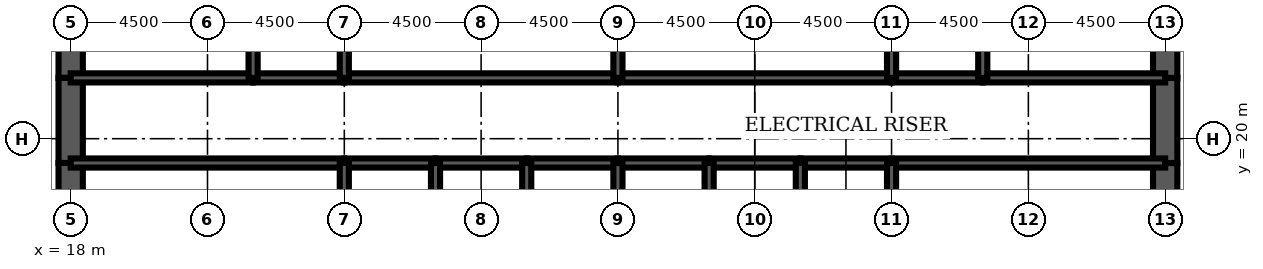
"""IFC4 building model, lengths in metres.
Left out: names, types, materials, properties, quantities, classifications, styles, units other than length and angle.
Written with IfcOpenShell. Run it as: python <this file> out.ifc"""

import sys

from ifc_helpers import new_model, si_unit, direction, frame, frame_2d, origin, place, context, subcontext, project, spatial, rectangle, extrude, element, fill, save


model = new_model("IFC4")
c1 = context("Model", 3, precision=1e-05, world=origin(), true_north=direction((0.0, 1.0)))
c2 = subcontext(c1, "Body", "Model", "MODEL_VIEW")
j1 = project(units=[si_unit("LENGTHUNIT", "METRE"), si_unit("PLANEANGLEUNIT", "RADIAN")], contexts=[c1])
p1 = place(None, origin())
s1 = spatial("IfcSite", under=j1, at=p1, CompositionType="ELEMENT")
p2 = place(p1, origin())
s2 = spatial("IfcBuilding", under=s1, at=p2, CompositionType="ELEMENT")
p3 = place(p2, frame((0.0, 0.0, 194.2)))
s3 = spatial("IfcBuildingStorey", under=s2, at=p3, CompositionType="ELEMENT", Elevation=194.2)
p4 = place(p3, frame((18.0, 26.0, 0.0), z_axis=(0.0, 0.0, 1.0), x_axis=(0.0, -1.0, 0.0)))
e1 = element("IfcWall", 1, at=p4, inside=s3, PredefinedType="SHEAR", context=c2, shape_type="SweptSolid", body=[
    extrude(rectangle(XDim=4.0, YDim=0.8, at=frame_2d((2.0, 0.0))), origin(), (0.0, 0.0, 1.0), 4.2),
])
p5 = place(p3, frame((18.0, 22.0, 0.0), z_axis=(0.0, 0.0, 1.0), x_axis=(0.0, -1.0, 0.0)))
e2 = element("IfcWall", 2, at=p5, inside=s3, PredefinedType="SHEAR", context=c2, shape_type="SweptSolid", body=[
    extrude(rectangle(XDim=2.8, YDim=0.8, at=frame_2d((1.4, 0.0))), origin(), (0.0, 0.0, 1.0), 4.2),
])
p6 = place(p5, frame((0.6, 0.0, 0.0)))
e3 = element("IfcOpeningElement", 3, at=p6, cuts=e2, PredefinedType="OPENING", context=c2, shape_type="SweptSolid", body=[
    extrude(rectangle(XDim=1.8, YDim=2.1, at=frame_2d((0.9, 1.05))), frame((0.0, 0.41, 0.0), z_axis=(0.0, -1.0, 0.0), x_axis=(1.0, 0.0, 0.0)), (0.0, 0.0, 1.0), 0.82),
])
for number, where, z_axis, x_axis in (
    (4, (18.0, 19.2, 0.0), (0.0, 0.0, 1.0), (0.0, -1.0, 0.0)),
    (5, (54.0, 16.0, 0.0), (0.0, 0.0, 1.0), (0.0, 1.0, 0.0)),
):
    element("IfcWall", number, at=place(p3, frame(where, z_axis=z_axis, x_axis=x_axis)), inside=s3, PredefinedType="SHEAR", context=c2, shape_type="SweptSolid", body=[
        extrude(rectangle(XDim=3.2, YDim=0.8, at=frame_2d((1.6, 0.0))), origin(), (0.0, 0.0, 1.0), 4.2),
    ])
p7 = place(p3, frame((54.0, 19.2, 0.0), z_axis=(0.0, 0.0, 1.0), x_axis=(0.0, 1.0, 0.0)))
e6 = element("IfcWall", 6, at=p7, inside=s3, PredefinedType="SHEAR", context=c2, shape_type="SweptSolid", body=[
    extrude(rectangle(XDim=2.8, YDim=0.8, at=frame_2d((1.4, 0.0))), origin(), (0.0, 0.0, 1.0), 4.2),
])
p8 = place(p7, frame((0.4, 0.0, 0.0)))
e7 = element("IfcOpeningElement", 7, at=p8, cuts=e6, PredefinedType="OPENING", context=c2, shape_type="SweptSolid", body=[
    extrude(rectangle(XDim=1.8, YDim=2.1, at=frame_2d((0.9, 1.05))), frame((0.0, 0.41, 0.0), z_axis=(0.0, -1.0, 0.0), x_axis=(1.0, 0.0, 0.0)), (0.0, 0.0, 1.0), 0.82),
])
p9 = place(p3, frame((54.0, 22.0, 0.0), z_axis=(0.0, 0.0, 1.0), x_axis=(0.0, 1.0, 0.0)))
e8 = element("IfcWall", 8, at=p9, inside=s3, PredefinedType="SHEAR", context=c2, shape_type="SweptSolid", body=[
    extrude(rectangle(XDim=4.0, YDim=0.8, at=frame_2d((2.0, 0.0))), origin(), (0.0, 0.0, 1.0), 4.2),
])
p10 = place(p3, frame((18.0, 19.2, 0.0), z_axis=(0.0, 0.0, 1.0), x_axis=(1.0, 0.0, 0.0)))
e9 = element("IfcWall", 9, at=p10, inside=s3, PredefinedType="SOLIDWALL", context=c2, shape_type="SweptSolid", body=[
    extrude(rectangle(XDim=9.0, YDim=0.3, at=frame_2d((4.5, 0.0))), origin(), (0.0, 0.0, 1.0), 4.2),
])
p11 = place(p10, frame((0.65, 0.0, 0.0)))
e10 = element("IfcOpeningElement", 10, at=p11, cuts=e9, PredefinedType="OPENING", context=c2, shape_type="SweptSolid", body=[
    extrude(rectangle(XDim=1.0, YDim=2.1, at=frame_2d((0.5, 1.05))), frame((0.0, 0.16, 0.0), z_axis=(0.0, -1.0, 0.0), x_axis=(1.0, 0.0, 0.0)), (0.0, 0.0, 1.0), 0.32),
])
p12 = place(p3, frame((27.0, 19.2, 0.0), z_axis=(0.0, 0.0, 1.0), x_axis=(1.0, 0.0, 0.0)))
e11 = element("IfcWall", 11, at=p12, inside=s3, PredefinedType="SOLIDWALL", context=c2, shape_type="SweptSolid", body=[
    extrude(rectangle(XDim=3.0, YDim=0.3, at=frame_2d((1.5, 0.0))), origin(), (0.0, 0.0, 1.0), 4.2),
])
p13 = place(p12, frame((0.95, 0.0, 0.0)))
e12 = element("IfcOpeningElement", 12, at=p13, cuts=e11, PredefinedType="OPENING", context=c2, shape_type="SweptSolid", body=[
    extrude(rectangle(XDim=1.1, YDim=2.2, at=frame_2d((0.55, 1.1))), frame((0.0, 0.16, 0.0), z_axis=(0.0, -1.0, 0.0), x_axis=(1.0, 0.0, 0.0)), (0.0, 0.0, 1.0), 0.32),
])
p14 = place(p3, frame((30.0, 19.2, 0.0), z_axis=(0.0, 0.0, 1.0), x_axis=(1.0, 0.0, 0.0)))
e13 = element("IfcWall", 13, at=p14, inside=s3, PredefinedType="SOLIDWALL", context=c2, shape_type="SweptSolid", body=[
    extrude(rectangle(XDim=3.0, YDim=0.3, at=frame_2d((1.5, 0.0))), origin(), (0.0, 0.0, 1.0), 4.2),
])
p15 = place(p14, frame((0.95, 0.0, 0.0)))
e14 = element("IfcOpeningElement", 14, at=p15, cuts=e13, PredefinedType="OPENING", context=c2, shape_type="SweptSolid", body=[
    extrude(rectangle(XDim=1.1, YDim=2.2, at=frame_2d((0.55, 1.1))), frame((0.0, 0.16, 0.0), z_axis=(0.0, -1.0, 0.0), x_axis=(1.0, 0.0, 0.0)), (0.0, 0.0, 1.0), 0.32),
])
p16 = place(p3, frame((33.0, 19.2, 0.0), z_axis=(0.0, 0.0, 1.0), x_axis=(1.0, 0.0, 0.0)))
e15 = element("IfcWall", 15, at=p16, inside=s3, PredefinedType="SOLIDWALL", context=c2, shape_type="SweptSolid", body=[
    extrude(rectangle(XDim=3.0, YDim=0.3, at=frame_2d((1.5, 0.0))), origin(), (0.0, 0.0, 1.0), 4.2),
])
p17 = place(p16, frame((0.95, 0.0, 0.0)))
e16 = element("IfcOpeningElement", 16, at=p17, cuts=e15, PredefinedType="OPENING", context=c2, shape_type="SweptSolid", body=[
    extrude(rectangle(XDim=1.1, YDim=2.2, at=frame_2d((0.55, 1.1))), frame((0.0, 0.16, 0.0), z_axis=(0.0, -1.0, 0.0), x_axis=(1.0, 0.0, 0.0)), (0.0, 0.0, 1.0), 0.32),
])
p18 = place(p3, frame((36.0, 19.2, 0.0), z_axis=(0.0, 0.0, 1.0), x_axis=(1.0, 0.0, 0.0)))
e17 = element("IfcWall", 17, at=p18, inside=s3, PredefinedType="SOLIDWALL", context=c2, shape_type="SweptSolid", body=[
    extrude(rectangle(XDim=3.0, YDim=0.3, at=frame_2d((1.5, 0.0))), origin(), (0.0, 0.0, 1.0), 4.2),
])
p19 = place(p18, frame((0.95, 0.0, 0.0)))
e18 = element("IfcOpeningElement", 18, at=p19, cuts=e17, PredefinedType="OPENING", context=c2, shape_type="SweptSolid", body=[
    extrude(rectangle(XDim=1.1, YDim=2.2, at=frame_2d((0.55, 1.1))), frame((0.0, 0.16, 0.0), z_axis=(0.0, -1.0, 0.0), x_axis=(1.0, 0.0, 0.0)), (0.0, 0.0, 1.0), 0.32),
])
p20 = place(p3, frame((39.0, 19.2, 0.0), z_axis=(0.0, 0.0, 1.0), x_axis=(1.0, 0.0, 0.0)))
e19 = element("IfcWall", 19, at=p20, inside=s3, PredefinedType="SOLIDWALL", context=c2, shape_type="SweptSolid", body=[
    extrude(rectangle(XDim=3.0, YDim=0.3, at=frame_2d((1.5, 0.0))), origin(), (0.0, 0.0, 1.0), 4.2),
])
p21 = place(p20, frame((1.0, 0.0, 0.0)))
e20 = element("IfcOpeningElement", 20, at=p21, cuts=e19, PredefinedType="OPENING", context=c2, shape_type="SweptSolid", body=[
    extrude(rectangle(XDim=1.0, YDim=2.1, at=frame_2d((0.5, 1.05))), frame((0.0, 0.16, 0.0), z_axis=(0.0, -1.0, 0.0), x_axis=(1.0, 0.0, 0.0)), (0.0, 0.0, 1.0), 0.32),
])
p22 = place(p3, frame((42.0, 19.2, 0.0), z_axis=(0.0, 0.0, 1.0), x_axis=(1.0, 0.0, 0.0)))
e21 = element("IfcWall", 21, at=p22, inside=s3, PredefinedType="SOLIDWALL", context=c2, shape_type="SweptSolid", body=[
    extrude(rectangle(XDim=3.0, YDim=0.3, at=frame_2d((1.5, 0.0))), origin(), (0.0, 0.0, 1.0), 4.2),
])
p23 = place(p22, frame((1.0, 0.0, 0.0)))
e22 = element("IfcOpeningElement", 22, at=p23, cuts=e21, PredefinedType="OPENING", context=c2, shape_type="SweptSolid", body=[
    extrude(rectangle(XDim=1.0, YDim=2.1, at=frame_2d((0.5, 1.05))), frame((0.0, 0.16, 0.0), z_axis=(0.0, -1.0, 0.0), x_axis=(1.0, 0.0, 0.0)), (0.0, 0.0, 1.0), 0.32),
])
p24 = place(p3, frame((45.0, 19.2, 0.0), z_axis=(0.0, 0.0, 1.0), x_axis=(1.0, 0.0, 0.0)))
e23 = element("IfcWall", 23, at=p24, inside=s3, PredefinedType="SOLIDWALL", context=c2, shape_type="SweptSolid", body=[
    extrude(rectangle(XDim=9.0, YDim=0.3, at=frame_2d((4.5, 0.0))), origin(), (0.0, 0.0, 1.0), 4.2),
])
p25 = place(p24, frame((7.35, 0.0, 0.0)))
e24 = element("IfcOpeningElement", 24, at=p25, cuts=e23, PredefinedType="OPENING", context=c2, shape_type="SweptSolid", body=[
    extrude(rectangle(XDim=1.0, YDim=2.1, at=frame_2d((0.5, 1.05))), frame((0.0, 0.16, 0.0), z_axis=(0.0, -1.0, 0.0), x_axis=(1.0, 0.0, 0.0)), (0.0, 0.0, 1.0), 0.32),
])
p26 = place(p3, frame((18.0, 22.0, 0.0), z_axis=(0.0, 0.0, 1.0), x_axis=(1.0, 0.0, 0.0)))
e25 = element("IfcWall", 25, at=p26, inside=s3, PredefinedType="SOLIDWALL", context=c2, shape_type="SweptSolid", body=[
    extrude(rectangle(XDim=6.0, YDim=0.3, at=frame_2d((3.0, 0.0))), origin(), (0.0, 0.0, 1.0), 4.2),
])
p27 = place(p26, frame((4.4, 0.0, 0.0)))
e26 = element("IfcOpeningElement", 26, at=p27, cuts=e25, PredefinedType="OPENING", context=c2, shape_type="SweptSolid", body=[
    extrude(rectangle(XDim=1.0, YDim=2.1, at=frame_2d((0.5, 1.05))), frame((0.0, 0.16, 0.0), z_axis=(0.0, -1.0, 0.0), x_axis=(1.0, 0.0, 0.0)), (0.0, 0.0, 1.0), 0.32),
])
p28 = place(p26, frame((0.95, 0.0, 0.0)))
e27 = element("IfcOpeningElement", 27, at=p28, cuts=e25, PredefinedType="OPENING", context=c2, shape_type="SweptSolid", body=[
    extrude(rectangle(XDim=1.0, YDim=2.1, at=frame_2d((0.5, 1.05))), frame((0.0, 0.16, 0.0), z_axis=(0.0, -1.0, 0.0), x_axis=(1.0, 0.0, 0.0)), (0.0, 0.0, 1.0), 0.32),
])
p29 = place(p3, frame((24.0, 22.0, 0.0), z_axis=(0.0, 0.0, 1.0), x_axis=(1.0, 0.0, 0.0)))
e28 = element("IfcWall", 28, at=p29, inside=s3, PredefinedType="SOLIDWALL", context=c2, shape_type="SweptSolid", body=[
    extrude(rectangle(XDim=3.0, YDim=0.3, at=frame_2d((1.5, 0.0))), origin(), (0.0, 0.0, 1.0), 4.2),
])
p30 = place(p29, frame((1.0, 0.0, 0.0)))
e29 = element("IfcOpeningElement", 29, at=p30, cuts=e28, PredefinedType="OPENING", context=c2, shape_type="SweptSolid", body=[
    extrude(rectangle(XDim=1.0, YDim=2.1, at=frame_2d((0.5, 1.05))), frame((0.0, 0.16, 0.0), z_axis=(0.0, -1.0, 0.0), x_axis=(1.0, 0.0, 0.0)), (0.0, 0.0, 1.0), 0.32),
])
p31 = place(p3, frame((27.0, 22.0, 0.0), z_axis=(0.0, 0.0, 1.0), x_axis=(1.0, 0.0, 0.0)))
e30 = element("IfcWall", 30, at=p31, inside=s3, PredefinedType="SOLIDWALL", context=c2, shape_type="SweptSolid", body=[
    extrude(rectangle(XDim=9.0, YDim=0.3, at=frame_2d((4.5, 0.0))), origin(), (0.0, 0.0, 1.0), 4.2),
])
p32 = place(p31, frame((4.0, 0.0, 0.0)))
e31 = element("IfcOpeningElement", 31, at=p32, cuts=e30, PredefinedType="OPENING", context=c2, shape_type="SweptSolid", body=[
    extrude(rectangle(XDim=1.0, YDim=2.1, at=frame_2d((0.5, 1.05))), frame((0.0, 0.16, 0.0), z_axis=(0.0, -1.0, 0.0), x_axis=(1.0, 0.0, 0.0)), (0.0, 0.0, 1.0), 0.32),
])
p33 = place(p3, frame((36.0, 22.0, 0.0), z_axis=(0.0, 0.0, 1.0), x_axis=(1.0, 0.0, 0.0)))
e32 = element("IfcWall", 32, at=p33, inside=s3, PredefinedType="SOLIDWALL", context=c2, shape_type="SweptSolid", body=[
    extrude(rectangle(XDim=9.0, YDim=0.3, at=frame_2d((4.5, 0.0))), origin(), (0.0, 0.0, 1.0), 4.2),
])
p34 = place(p33, frame((4.0, 0.0, 0.0)))
e33 = element("IfcOpeningElement", 33, at=p34, cuts=e32, PredefinedType="OPENING", context=c2, shape_type="SweptSolid", body=[
    extrude(rectangle(XDim=1.0, YDim=2.1, at=frame_2d((0.5, 1.05))), frame((0.0, 0.16, 0.0), z_axis=(0.0, -1.0, 0.0), x_axis=(1.0, 0.0, 0.0)), (0.0, 0.0, 1.0), 0.32),
])
p35 = place(p3, frame((45.0, 22.0, 0.0), z_axis=(0.0, 0.0, 1.0), x_axis=(1.0, 0.0, 0.0)))
e34 = element("IfcWall", 34, at=p35, inside=s3, PredefinedType="SOLIDWALL", context=c2, shape_type="SweptSolid", body=[
    extrude(rectangle(XDim=3.0, YDim=0.3, at=frame_2d((1.5, 0.0))), origin(), (0.0, 0.0, 1.0), 4.2),
])
p36 = place(p35, frame((1.0, 0.0, 0.0)))
e35 = element("IfcOpeningElement", 35, at=p36, cuts=e34, PredefinedType="OPENING", context=c2, shape_type="SweptSolid", body=[
    extrude(rectangle(XDim=1.0, YDim=2.1, at=frame_2d((0.5, 1.05))), frame((0.0, 0.16, 0.0), z_axis=(0.0, -1.0, 0.0), x_axis=(1.0, 0.0, 0.0)), (0.0, 0.0, 1.0), 0.32),
])
p37 = place(p3, frame((48.0, 22.0, 0.0), z_axis=(0.0, 0.0, 1.0), x_axis=(1.0, 0.0, 0.0)))
e36 = element("IfcWall", 36, at=p37, inside=s3, PredefinedType="SOLIDWALL", context=c2, shape_type="SweptSolid", body=[
    extrude(rectangle(XDim=6.0, YDim=0.3, at=frame_2d((3.0, 0.0))), origin(), (0.0, 0.0, 1.0), 4.2),
])
p38 = place(p37, frame((2.0, 0.0, 0.0)))
e37 = element("IfcOpeningElement", 37, at=p38, cuts=e36, PredefinedType="OPENING", context=c2, shape_type="SweptSolid", body=[
    extrude(rectangle(XDim=1.0, YDim=2.1, at=frame_2d((0.5, 1.05))), frame((0.0, 0.16, 0.0), z_axis=(0.0, -1.0, 0.0), x_axis=(1.0, 0.0, 0.0)), (0.0, 0.0, 1.0), 0.32),
])
p39 = place(p37, frame((4.05, 0.0, 0.0)))
e38 = element("IfcOpeningElement", 38, at=p39, cuts=e36, PredefinedType="OPENING", context=c2, shape_type="SweptSolid", body=[
    extrude(rectangle(XDim=1.0, YDim=2.1, at=frame_2d((0.5, 1.05))), frame((0.0, 0.16, 0.0), z_axis=(0.0, -1.0, 0.0), x_axis=(1.0, 0.0, 0.0)), (0.0, 0.0, 1.0), 0.32),
])
for number, where, z_axis, x_axis in (
    (39, (27.0, 16.0, 0.0), (0.0, 0.0, 1.0), (0.0, 1.0, 0.0)),
    (40, (30.0, 16.0, 0.0), (0.0, 0.0, 1.0), (0.0, 1.0, 0.0)),
    (41, (33.0, 16.0, 0.0), (0.0, 0.0, 1.0), (0.0, 1.0, 0.0)),
    (42, (36.0, 16.0, 0.0), (0.0, 0.0, 1.0), (0.0, 1.0, 0.0)),
    (43, (39.0, 16.0, 0.0), (0.0, 0.0, 1.0), (0.0, 1.0, 0.0)),
    (44, (42.0, 16.0, 0.0), (0.0, 0.0, 1.0), (0.0, 1.0, 0.0)),
    (45, (45.0, 16.0, 0.0), (0.0, 0.0, 1.0), (0.0, 1.0, 0.0)),
):
    element("IfcWall", number, at=place(p3, frame(where, z_axis=z_axis, x_axis=x_axis)), inside=s3, PredefinedType="SOLIDWALL", context=c2, shape_type="SweptSolid", body=[
        extrude(rectangle(XDim=3.2, YDim=0.3, at=frame_2d((1.6, 0.0))), origin(), (0.0, 0.0, 1.0), 4.2),
    ])
for number, where, z_axis, x_axis in (
    (46, (24.0, 22.0, 0.0), (0.0, 0.0, 1.0), (0.0, 1.0, 0.0)),
    (47, (27.0, 22.0, 0.0), (0.0, 0.0, 1.0), (0.0, 1.0, 0.0)),
    (48, (36.0, 22.0, 0.0), (0.0, 0.0, 1.0), (0.0, 1.0, 0.0)),
    (49, (45.0, 22.0, 0.0), (0.0, 0.0, 1.0), (0.0, 1.0, 0.0)),
    (50, (48.0, 22.0, 0.0), (0.0, 0.0, 1.0), (0.0, 1.0, 0.0)),
):
    element("IfcWall", number, at=place(p3, frame(where, z_axis=z_axis, x_axis=x_axis)), inside=s3, PredefinedType="SOLIDWALL", context=c2, shape_type="SweptSolid", body=[
        extrude(rectangle(XDim=4.0, YDim=0.3, at=frame_2d((2.0, 0.0))), origin(), (0.0, 0.0, 1.0), 4.2),
    ])
p40 = place(p3, frame((38.5, 22.15, 0.0), z_axis=(0.0, 0.0, 1.0), x_axis=(0.0, 1.0, 0.0)))
e51 = element("IfcWall", 51, at=p40, inside=s3, PredefinedType="PARTITIONING", context=c2, shape_type="SweptSolid", body=[
    extrude(rectangle(XDim=3.7, YDim=0.15, at=frame_2d((1.85, 0.0))), origin(), (0.0, 0.0, 1.0), 3.0),
])
p41 = place(p40, frame((2.2, 0.0, 0.0)))
e52 = element("IfcOpeningElement", 52, at=p41, cuts=e51, PredefinedType="OPENING", context=c2, shape_type="SweptSolid", body=[
    extrude(rectangle(XDim=1.0, YDim=2.1, at=frame_2d((0.5, 1.05))), frame((0.0, 0.085, 0.0), z_axis=(0.0, -1.0, 0.0), x_axis=(1.0, 0.0, 0.0)), (0.0, 0.0, 1.0), 0.17),
])
for number, where, z_axis, x_axis in (
    (53, (20.575, 22.15, 0.0), (0.0, 0.0, 1.0), (0.0, 1.0, 0.0)),
    (54, (51.425, 22.15, 0.0), (0.0, 0.0, 1.0), (0.0, 1.0, 0.0)),
):
    element("IfcWall", number, at=place(p3, frame(where, z_axis=z_axis, x_axis=x_axis)), inside=s3, PredefinedType="PARTITIONING", context=c2, shape_type="SweptSolid", body=[
        extrude(rectangle(XDim=3.7, YDim=0.15, at=frame_2d((1.85, 0.0))), origin(), (0.0, 0.0, 1.0), 3.0),
    ])
p42 = place(p13, origin())
e55 = element("IfcDoor", 55, at=p42, inside=s3, OperationType="DOUBLE_DOOR_SLIDING", PredefinedType="USERDEFINED", context=c2, shape_type="SweptSolid", body=[
    extrude(rectangle(XDim=1.1, YDim=2.2, at=frame_2d((0.55, 1.1))), frame((0.0, 0.025, 0.0), z_axis=(0.0, -1.0, 0.0), x_axis=(1.0, 0.0, 0.0)), (0.0, 0.0, 1.0), 0.05),
])
fill(e12, e55)
p43 = place(p15, origin())
e56 = element("IfcDoor", 56, at=p43, inside=s3, OperationType="DOUBLE_DOOR_SLIDING", PredefinedType="USERDEFINED", context=c2, shape_type="SweptSolid", body=[
    extrude(rectangle(XDim=1.1, YDim=2.2, at=frame_2d((0.55, 1.1))), frame((0.0, 0.025, 0.0), z_axis=(0.0, -1.0, 0.0), x_axis=(1.0, 0.0, 0.0)), (0.0, 0.0, 1.0), 0.05),
])
fill(e14, e56)
p44 = place(p17, origin())
e57 = element("IfcDoor", 57, at=p44, inside=s3, OperationType="DOUBLE_DOOR_SLIDING", PredefinedType="USERDEFINED", context=c2, shape_type="SweptSolid", body=[
    extrude(rectangle(XDim=1.1, YDim=2.2, at=frame_2d((0.55, 1.1))), frame((0.0, 0.025, 0.0), z_axis=(0.0, -1.0, 0.0), x_axis=(1.0, 0.0, 0.0)), (0.0, 0.0, 1.0), 0.05),
])
fill(e16, e57)
p45 = place(p19, origin())
e58 = element("IfcDoor", 58, at=p45, inside=s3, OperationType="DOUBLE_DOOR_SLIDING", PredefinedType="USERDEFINED", context=c2, shape_type="SweptSolid", body=[
    extrude(rectangle(XDim=1.1, YDim=2.2, at=frame_2d((0.55, 1.1))), frame((0.0, 0.025, 0.0), z_axis=(0.0, -1.0, 0.0), x_axis=(1.0, 0.0, 0.0)), (0.0, 0.0, 1.0), 0.05),
])
fill(e18, e58)
p46 = place(p11, origin())
e59 = element("IfcDoor", 59, at=p46, inside=s3, OperationType="SINGLE_SWING_LEFT", PredefinedType="DOOR", context=c2, shape_type="SweptSolid", body=[
    extrude(rectangle(XDim=1.0, YDim=2.1, at=frame_2d((0.5, 1.05))), frame((0.0, 0.025, 0.0), z_axis=(0.0, -1.0, 0.0), x_axis=(1.0, 0.0, 0.0)), (0.0, 0.0, 1.0), 0.05),
])
fill(e10, e59)
p47 = place(p25, origin())
e60 = element("IfcDoor", 60, at=p47, inside=s3, OperationType="SINGLE_SWING_RIGHT", PredefinedType="DOOR", context=c2, shape_type="SweptSolid", body=[
    extrude(rectangle(XDim=1.0, YDim=2.1, at=frame_2d((0.5, 1.05))), frame((0.0, 0.025, 0.0), z_axis=(0.0, -1.0, 0.0), x_axis=(1.0, 0.0, 0.0)), (0.0, 0.0, 1.0), 0.05),
])
fill(e24, e60)
p48 = place(p6, origin())
e61 = element("IfcDoor", 61, at=p48, inside=s3, OperationType="SINGLE_SWING_LEFT", PredefinedType="DOOR", context=c2, shape_type="SweptSolid", body=[
    extrude(rectangle(XDim=1.8, YDim=2.1, at=frame_2d((0.9, 1.05))), frame((0.0, 0.4, 0.0), z_axis=(0.0, -1.0, 0.0), x_axis=(1.0, 0.0, 0.0)), (0.0, 0.0, 1.0), 0.8),
])
fill(e3, e61)
p49 = place(p8, origin())
e62 = element("IfcDoor", 62, at=p49, inside=s3, OperationType="SINGLE_SWING_LEFT", PredefinedType="DOOR", context=c2, shape_type="SweptSolid", body=[
    extrude(rectangle(XDim=1.8, YDim=2.1, at=frame_2d((0.9, 1.05))), frame((0.0, 0.4, 0.0), z_axis=(0.0, -1.0, 0.0), x_axis=(1.0, 0.0, 0.0)), (0.0, 0.0, 1.0), 0.8),
])
fill(e7, e62)
p50 = place(p27, origin())
e63 = element("IfcDoor", 63, at=p50, inside=s3, OperationType="SINGLE_SWING_RIGHT", PredefinedType="DOOR", context=c2, shape_type="SweptSolid", body=[
    extrude(rectangle(XDim=1.0, YDim=2.1, at=frame_2d((0.5, 1.05))), frame((0.0, 0.025, 0.0), z_axis=(0.0, -1.0, 0.0), x_axis=(1.0, 0.0, 0.0)), (0.0, 0.0, 1.0), 0.05),
])
fill(e26, e63)
p51 = place(p30, origin())
e64 = element("IfcDoor", 64, at=p51, inside=s3, OperationType="SINGLE_SWING_LEFT", PredefinedType="DOOR", context=c2, shape_type="SweptSolid", body=[
    extrude(rectangle(XDim=1.0, YDim=2.1, at=frame_2d((0.5, 1.05))), frame((0.0, 0.025, 0.0), z_axis=(0.0, -1.0, 0.0), x_axis=(1.0, 0.0, 0.0)), (0.0, 0.0, 1.0), 0.05),
])
fill(e29, e64)
p52 = place(p32, origin())
e65 = element("IfcDoor", 65, at=p52, inside=s3, OperationType="SINGLE_SWING_LEFT", PredefinedType="DOOR", context=c2, shape_type="SweptSolid", body=[
    extrude(rectangle(XDim=1.0, YDim=2.1, at=frame_2d((0.5, 1.05))), frame((0.0, 0.025, 0.0), z_axis=(0.0, -1.0, 0.0), x_axis=(1.0, 0.0, 0.0)), (0.0, 0.0, 1.0), 0.05),
])
fill(e31, e65)
p53 = place(p34, origin())
e66 = element("IfcDoor", 66, at=p53, inside=s3, OperationType="SINGLE_SWING_LEFT", PredefinedType="DOOR", context=c2, shape_type="SweptSolid", body=[
    extrude(rectangle(XDim=1.0, YDim=2.1, at=frame_2d((0.5, 1.05))), frame((0.0, 0.025, 0.0), z_axis=(0.0, -1.0, 0.0), x_axis=(1.0, 0.0, 0.0)), (0.0, 0.0, 1.0), 0.05),
])
fill(e33, e66)
p54 = place(p36, origin())
e67 = element("IfcDoor", 67, at=p54, inside=s3, OperationType="SINGLE_SWING_LEFT", PredefinedType="DOOR", context=c2, shape_type="SweptSolid", body=[
    extrude(rectangle(XDim=1.0, YDim=2.1, at=frame_2d((0.5, 1.05))), frame((0.0, 0.025, 0.0), z_axis=(0.0, -1.0, 0.0), x_axis=(1.0, 0.0, 0.0)), (0.0, 0.0, 1.0), 0.05),
])
fill(e35, e67)
p55 = place(p38, origin())
e68 = element("IfcDoor", 68, at=p55, inside=s3, OperationType="SINGLE_SWING_LEFT", PredefinedType="DOOR", context=c2, shape_type="SweptSolid", body=[
    extrude(rectangle(XDim=1.0, YDim=2.1, at=frame_2d((0.5, 1.05))), frame((0.0, 0.025, 0.0), z_axis=(0.0, -1.0, 0.0), x_axis=(1.0, 0.0, 0.0)), (0.0, 0.0, 1.0), 0.05),
])
fill(e37, e68)
p56 = place(p28, origin())
e69 = element("IfcDoor", 69, at=p56, inside=s3, OperationType="SINGLE_SWING_LEFT", PredefinedType="DOOR", context=c2, shape_type="SweptSolid", body=[
    extrude(rectangle(XDim=1.0, YDim=2.1, at=frame_2d((0.5, 1.05))), frame((0.0, 0.025, 0.0), z_axis=(0.0, -1.0, 0.0), x_axis=(1.0, 0.0, 0.0)), (0.0, 0.0, 1.0), 0.05),
])
fill(e27, e69)
p57 = place(p39, origin())
e70 = element("IfcDoor", 70, at=p57, inside=s3, OperationType="SINGLE_SWING_RIGHT", PredefinedType="DOOR", context=c2, shape_type="SweptSolid", body=[
    extrude(rectangle(XDim=1.0, YDim=2.1, at=frame_2d((0.5, 1.05))), frame((0.0, 0.025, 0.0), z_axis=(0.0, -1.0, 0.0), x_axis=(1.0, 0.0, 0.0)), (0.0, 0.0, 1.0), 0.05),
])
fill(e38, e70)
p58 = place(p21, origin())
e71 = element("IfcDoor", 71, at=p58, inside=s3, OperationType="SINGLE_SWING_LEFT", PredefinedType="DOOR", context=c2, shape_type="SweptSolid", body=[
    extrude(rectangle(XDim=1.0, YDim=2.1, at=frame_2d((0.5, 1.05))), frame((0.0, 0.025, 0.0), z_axis=(0.0, -1.0, 0.0), x_axis=(1.0, 0.0, 0.0)), (0.0, 0.0, 1.0), 0.05),
])
fill(e20, e71)
p59 = place(p23, origin())
e72 = element("IfcDoor", 72, at=p59, inside=s3, OperationType="SINGLE_SWING_LEFT", PredefinedType="DOOR", context=c2, shape_type="SweptSolid", body=[
    extrude(rectangle(XDim=1.0, YDim=2.1, at=frame_2d((0.5, 1.05))), frame((0.0, 0.025, 0.0), z_axis=(0.0, -1.0, 0.0), x_axis=(1.0, 0.0, 0.0)), (0.0, 0.0, 1.0), 0.05),
])
fill(e22, e72)
save(model, sys.argv[1])
